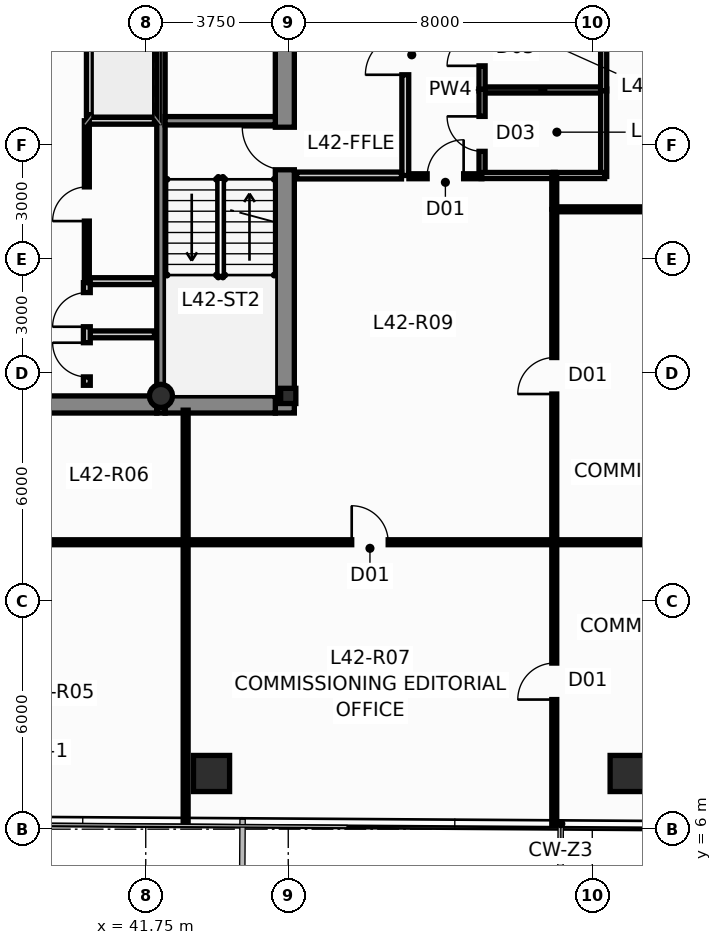
"""IFC4 building model, lengths in metres.
Left out: names, types, materials, properties, quantities, classifications, styles, units other than length and angle.
Written with IfcOpenShell. Run it as: python <this file> out.ifc"""

import sys

from ifc_helpers import new_model, si_unit, direction, frame, frame_2d, origin, origin_2d, place, context, subcontext, project, spatial, rectangle, hollow_rectangle, hollow_circle, i_section, extrude, source, transform, mapped, element, fill, save


model = new_model("IFC4")
c1 = context("Model", 3, precision=1e-05, world=origin(), true_north=direction((0.0, 1.0)))
c2 = subcontext(c1, "Body", "Model", "MODEL_VIEW")
j1 = project(units=[si_unit("LENGTHUNIT", "METRE"), si_unit("PLANEANGLEUNIT", "RADIAN")], contexts=[c1])
p1 = place(None, origin())
s1 = spatial("IfcSite", under=j1, at=p1, CompositionType="ELEMENT")
p2 = place(p1, origin())
s2 = spatial("IfcBuilding", under=s1, at=p2, CompositionType="ELEMENT")
p3 = place(p2, frame((0.0, 0.0, 162.15)))
s3 = spatial("IfcBuildingStorey", under=s2, at=p3, CompositionType="ELEMENT", Elevation=162.15)
m1 = source(origin(), c2, "Body", "SweptSolid", [
    extrude(i_section(OverallWidth=0.4, OverallDepth=0.4, WebThickness=0.02, FlangeThickness=0.032, at=origin_2d()), origin(), (0.0, 0.0, 1.0), 3.65),
])
p4 = place(p3, frame((45.5, 17.4, 0.0), z_axis=(0.0, 0.0, 1.0), x_axis=(1.0, 0.0, 0.0)))
e1 = element("IfcColumn", 1, at=p4, inside=s3, PredefinedType="COLUMN", context=c2, shape_type="MappedRepresentation", body=[
    mapped(m1, transform((0.0, 0.0, 0.0), scale=1.0)),
])
m2 = source(origin(), c2, "Body", "SweptSolid", [
    extrude(hollow_circle(Radius=0.305, WallThickness=0.025, at=origin_2d()), origin(), (0.0, 0.0, 1.0), 3.65),
])
p5 = place(p3, frame((42.15, 17.4, 0.0), z_axis=(0.0, 0.0, 1.0), x_axis=(1.0, 0.0, 0.0)))
e2 = element("IfcColumn", 2, at=p5, inside=s3, PredefinedType="COLUMN", context=c2, shape_type="MappedRepresentation", body=[
    mapped(m2, transform((0.0, 0.0, 0.0), scale=1.0)),
])
p6 = place(p3, frame((45.41, 16.95, 0.0), z_axis=(0.0, 0.0, 1.0), x_axis=(0.0, 1.0, 0.0)))
e3 = element("IfcWall", 3, at=p6, inside=s3, PredefinedType="SHEAR", context=c2, shape_type="SweptSolid", body=[
    extrude(rectangle(XDim=13.275, YDim=0.5, at=frame_2d((6.638, 0.0))), origin(), (0.0, 0.0, 1.0), 3.65),
])
p7 = place(p6, frame((6.4, 0.0, 0.0)))
e4 = element("IfcOpeningElement", 4, at=p7, cuts=e3, PredefinedType="OPENING", context=c2, shape_type="SweptSolid", body=[
    extrude(rectangle(XDim=1.12, YDim=2.15, at=frame_2d((0.56, 1.075))), frame((0.0, 0.262, 0.0), z_axis=(0.0, -1.0, 0.0), x_axis=(1.0, 0.0, 0.0)), (0.0, 0.0, 1.0), 0.524),
])
p8 = place(p6, frame((10.85, 0.0, 0.0)))
e5 = element("IfcOpeningElement", 5, at=p8, cuts=e3, PredefinedType="OPENING", context=c2, shape_type="SweptSolid", body=[
    extrude(rectangle(XDim=1.2, YDim=2.2, at=frame_2d((0.6, 1.1))), frame((0.0, 0.262, 0.0), z_axis=(0.0, -1.0, 0.0), x_axis=(1.0, 0.0, 0.0)), (0.0, 0.0, 1.0), 0.524),
])
p9 = place(p3, frame((33.96, 17.175, 0.0), z_axis=(0.0, 0.0, 1.0), x_axis=(1.0, 0.0, 0.0)))
e6 = element("IfcWall", 6, at=p9, inside=s3, PredefinedType="SHEAR", context=c2, shape_type="SweptSolid", body=[
    extrude(rectangle(XDim=8.08, YDim=0.45, at=frame_2d((4.04, 0.0))), origin(), (0.0, 0.0, 1.0), 3.65),
])
p10 = place(p3, frame((42.26, 17.175, 0.0), z_axis=(0.0, 0.0, 1.0), x_axis=(1.0, 0.0, 0.0)))
e7 = element("IfcWall", 7, at=p10, inside=s3, PredefinedType="SHEAR", context=c2, shape_type="SweptSolid", body=[
    extrude(rectangle(XDim=2.9, YDim=0.45, at=frame_2d((1.45, 0.0))), origin(), (0.0, 0.0, 1.0), 3.65),
])
p11 = place(p3, frame((42.15, 16.95, 0.0), z_axis=(0.0, 0.0, 1.0), x_axis=(0.0, 1.0, 0.0)))
e8 = element("IfcWall", 8, at=p11, inside=s3, PredefinedType="SHEAR", context=c2, shape_type="SweptSolid", body=[
    extrude(rectangle(XDim=13.275, YDim=0.22, at=frame_2d((6.638, 0.0))), origin(), (0.0, 0.0, 1.0), 3.65),
])
p12 = place(p3, frame((42.26, 24.64, 0.0), z_axis=(0.0, 0.0, 1.0), x_axis=(1.0, 0.0, 0.0)))
e9 = element("IfcWall", 9, at=p12, inside=s3, PredefinedType="SHEAR", context=c2, shape_type="SweptSolid", body=[
    extrude(rectangle(XDim=2.9, YDim=0.22, at=frame_2d((1.45, 0.0))), origin(), (0.0, 0.0, 1.0), 3.65),
])
m3 = source(origin(), c2, "Body", "SweptSolid", [
    extrude(hollow_rectangle(XDim=0.95, YDim=0.95, WallThickness=0.05, at=origin_2d()), origin(), (0.0, 0.0, 1.0), 3.651),
])
p13 = place(p3, frame((43.481, 7.465, 0.0), z_axis=(0.004480382638, 0.019793929266, 0.999794042058), x_axis=(-0.975326687046, 0.220766513622, 0.0)))
e10 = element("IfcColumn", 10, at=p13, inside=s3, PredefinedType="COLUMN", context=c2, shape_type="MappedRepresentation", body=[
    mapped(m3, transform((0.0, 0.0, 0.0), scale=1.0)),
])
m4 = source(origin(), c2, "Body", "SweptSolid", [
    extrude(hollow_rectangle(XDim=0.95, YDim=0.95, WallThickness=0.05, at=origin_2d()), origin(), (0.0, 0.0, 1.0), 3.651),
])
p14 = place(p3, frame((54.445, 7.465, 0.0), z_axis=(0.013440068782, 0.019792340097, 0.999713772949), x_axis=(-0.827290216258, 0.561774775229, 0.0)))
e11 = element("IfcColumn", 11, at=p14, inside=s3, PredefinedType="COLUMN", context=c2, shape_type="MappedRepresentation", body=[
    mapped(m4, transform((0.0, 0.0, 0.0), scale=1.0)),
])
p15 = place(p3, frame((40.28, 24.8, 0.0), z_axis=(0.0, 0.0, 1.0), x_axis=(0.0, 1.0, 0.0)))
e12 = element("IfcWall", 12, at=p15, inside=s3, PredefinedType="PARTITIONING", context=c2, shape_type="SweptSolid", body=[
    extrude(rectangle(XDim=2.0, YDim=0.18, at=frame_2d((1.0, 0.0))), origin(), (0.0, 0.0, 1.0), 3.4),
])
p16 = place(p3, frame((40.2, 24.64, 0.0), z_axis=(0.0, 0.0, 1.0), x_axis=(1.0, 0.0, 0.0)))
e13 = element("IfcWall", 13, at=p16, inside=s3, PredefinedType="PARTITIONING", context=c2, shape_type="SweptSolid", body=[
    extrude(rectangle(XDim=1.78, YDim=0.18, at=frame_2d((0.89, 0.0))), origin(), (0.0, 0.0, 1.0), 3.4),
])
p17 = place(p3, frame((48.58, 23.2, 0.0), z_axis=(0.0, 0.0, 1.0), x_axis=(0.0, 1.0, 0.0)))
e14 = element("IfcWall", 14, at=p17, inside=s3, PredefinedType="PARTITIONING", context=c2, shape_type="SweptSolid", body=[
    extrude(rectangle(XDim=6.4, YDim=0.18, at=frame_2d((3.2, 0.0))), origin(), (0.0, 0.0, 1.0), 3.078),
])
p18 = place(p17, frame((2.65, 0.0, 0.0)))
e15 = element("IfcOpeningElement", 15, at=p18, cuts=e14, PredefinedType="OPENING", context=c2, shape_type="SweptSolid", body=[
    extrude(rectangle(XDim=1.05, YDim=2.15, at=frame_2d((0.525, 1.075))), frame((0.0, 0.102, 0.0), z_axis=(0.0, -1.0, 0.0), x_axis=(1.0, 0.0, 0.0)), (0.0, 0.0, 1.0), 0.204),
])
p19 = place(p3, frame((45.72, 23.2, 0.0), z_axis=(0.0, 0.0, 1.0), x_axis=(1.0, 0.0, 0.0)))
e16 = element("IfcWall", 16, at=p19, inside=s3, PredefinedType="PARTITIONING", context=c2, shape_type="SweptSolid", body=[
    extrude(rectangle(XDim=2.76, YDim=0.18, at=frame_2d((1.38, 0.0))), origin(), (0.0, 0.0, 1.0), 3.4),
])
p20 = place(p3, frame((40.22, 20.42, 0.0), z_axis=(0.0, 0.0, 1.0), x_axis=(1.0, 0.0, 0.0)))
e17 = element("IfcWall", 17, at=p20, inside=s3, PredefinedType="PARTITIONING", context=c2, shape_type="SweptSolid", body=[
    extrude(rectangle(XDim=1.76, YDim=0.18, at=frame_2d((0.88, 0.0))), origin(), (0.0, 0.0, 1.0), 3.4),
])
p21 = place(p3, frame((40.2, 20.5, 0.0), z_axis=(0.0, 0.0, 1.0), x_axis=(0.0, 1.0, 0.0)))
e18 = element("IfcWall", 18, at=p21, inside=s3, PredefinedType="PARTITIONING", context=c2, shape_type="SweptSolid", body=[
    extrude(rectangle(XDim=4.14, YDim=0.13, at=frame_2d((2.07, 0.0))), origin(), (0.0, 0.0, 1.0), 3.4),
])
p22 = place(p21, frame((1.5, 0.0, 0.0)))
e19 = element("IfcOpeningElement", 19, at=p22, cuts=e18, PredefinedType="OPENING", context=c2, shape_type="SweptSolid", body=[
    extrude(rectangle(XDim=0.9, YDim=2.1, at=frame_2d((0.45, 1.05))), frame((0.0, 0.077, 0.0), z_axis=(0.0, -1.0, 0.0), x_axis=(1.0, 0.0, 0.0)), (0.0, 0.0, 1.0), 0.154),
])
p23 = place(p3, frame((40.28, 19.02, 0.0), z_axis=(0.0, 0.0, 1.0), x_axis=(1.0, 0.0, 0.0)))
e20 = element("IfcWall", 20, at=p23, inside=s3, PredefinedType="PARTITIONING", context=c2, shape_type="SweptSolid", body=[
    extrude(rectangle(XDim=1.7, YDim=0.18, at=frame_2d((0.85, 0.0))), origin(), (0.0, 0.0, 1.0), 3.4),
])
p24 = place(p3, frame((40.2, 17.68, 0.0), z_axis=(0.0, 0.0, 1.0), x_axis=(0.0, 1.0, 0.0)))
e21 = element("IfcWall", 21, at=p24, inside=s3, PredefinedType="PARTITIONING", context=c2, shape_type="SweptSolid", body=[
    extrude(rectangle(XDim=2.7, YDim=0.18, at=frame_2d((1.35, 0.0))), origin(), (0.0, 0.0, 1.0), 3.4),
])
p25 = place(p24, frame((0.22, 0.0, 0.0)))
e22 = element("IfcOpeningElement", 22, at=p25, cuts=e21, PredefinedType="OPENING", context=c2, shape_type="SweptSolid", body=[
    extrude(rectangle(XDim=0.9, YDim=2.1, at=frame_2d((0.45, 1.05))), frame((0.0, 0.102, 0.0), z_axis=(0.0, -1.0, 0.0), x_axis=(1.0, 0.0, 0.0)), (0.0, 0.0, 1.0), 0.204),
])
p26 = place(p24, frame((1.54, 0.0, 0.0)))
e23 = element("IfcOpeningElement", 23, at=p26, cuts=e21, PredefinedType="OPENING", context=c2, shape_type="SweptSolid", body=[
    extrude(rectangle(XDim=0.9, YDim=2.1, at=frame_2d((0.45, 1.05))), frame((0.0, 0.102, 0.0), z_axis=(0.0, -1.0, 0.0), x_axis=(1.0, 0.0, 0.0)), (0.0, 0.0, 1.0), 0.204),
])
p27 = place(p3, frame((50.575, 25.45, 0.0), z_axis=(0.0, 0.0, 1.0), x_axis=(1.0, 0.0, 0.0)))
e24 = element("IfcWall", 24, at=p27, inside=s3, PredefinedType="PLUMBINGWALL", context=c2, shape_type="SweptSolid", body=[
    extrude(rectangle(XDim=3.25, YDim=0.16, at=frame_2d((1.625, 0.0))), origin(), (0.0, 0.0, 1.0), 3.4),
])
p28 = place(p3, frame((50.6, 25.425, 0.0), z_axis=(0.0, 0.0, 1.0), x_axis=(0.0, 1.0, 0.0)))
e25 = element("IfcWall", 25, at=p28, inside=s3, PredefinedType="PLUMBINGWALL", context=c2, shape_type="SweptSolid", body=[
    extrude(rectangle(XDim=2.3, YDim=0.16, at=frame_2d((1.15, 0.0))), origin(), (0.0, 0.0, 1.0), 3.078),
])
p29 = place(p28, frame((0.66, 0.0, 0.0)))
e26 = element("IfcOpeningElement", 26, at=p29, cuts=e25, PredefinedType="OPENING", context=c2, shape_type="SweptSolid", body=[
    extrude(rectangle(XDim=0.92, YDim=2.1, at=frame_2d((0.46, 1.05))), frame((0.0, 0.092, 0.0), z_axis=(0.0, -1.0, 0.0), x_axis=(1.0, 0.0, 0.0)), (0.0, 0.0, 1.0), 0.184),
])
p30 = place(p3, frame((50.6, 23.175, 0.0), z_axis=(0.0, 0.0, 1.0), x_axis=(0.0, 1.0, 0.0)))
e27 = element("IfcWall", 27, at=p30, inside=s3, PredefinedType="PLUMBINGWALL", context=c2, shape_type="SweptSolid", body=[
    extrude(rectangle(XDim=2.3, YDim=0.16, at=frame_2d((1.15, 0.0))), origin(), (0.0, 0.0, 1.0), 3.078),
])
p31 = place(p30, frame((0.66, 0.0, 0.0)))
e28 = element("IfcOpeningElement", 28, at=p31, cuts=e27, PredefinedType="OPENING", context=c2, shape_type="SweptSolid", body=[
    extrude(rectangle(XDim=0.92, YDim=2.1, at=frame_2d((0.46, 1.05))), frame((0.0, 0.092, 0.0), z_axis=(0.0, -1.0, 0.0), x_axis=(1.0, 0.0, 0.0)), (0.0, 0.0, 1.0), 0.184),
])
p32 = place(p3, frame((53.8, 23.175, 0.0), z_axis=(0.0, 0.0, 1.0), x_axis=(0.0, 1.0, 0.0)))
e29 = element("IfcWall", 29, at=p32, inside=s3, PredefinedType="PLUMBINGWALL", context=c2, shape_type="SweptSolid", body=[
    extrude(rectangle(XDim=2.3, YDim=0.16, at=frame_2d((1.15, 0.0))), origin(), (0.0, 0.0, 1.0), 3.078),
])
p33 = place(p3, frame((53.8, 25.425, 0.0), z_axis=(0.0, 0.0, 1.0), x_axis=(0.0, 1.0, 0.0)))
e30 = element("IfcWall", 30, at=p33, inside=s3, PredefinedType="PLUMBINGWALL", context=c2, shape_type="SweptSolid", body=[
    extrude(rectangle(XDim=2.3, YDim=0.16, at=frame_2d((1.15, 0.0))), origin(), (0.0, 0.0, 1.0), 3.4),
])
p34 = place(p3, frame((50.575, 23.2, 0.0), z_axis=(0.0, 0.0, 1.0), x_axis=(1.0, 0.0, 0.0)))
e31 = element("IfcWall", 31, at=p34, inside=s3, PredefinedType="PLUMBINGWALL", context=c2, shape_type="SweptSolid", body=[
    extrude(rectangle(XDim=1.95, YDim=0.16, at=frame_2d((0.975, 0.0))), origin(), (0.0, 0.0, 1.0), 3.4),
])
p35 = place(p3, frame((52.475, 23.2, 0.0), z_axis=(0.0, 0.0, 1.0), x_axis=(1.0, 0.0, 0.0)))
e32 = element("IfcWall", 32, at=p35, inside=s3, PredefinedType="PLUMBINGWALL", context=c2, shape_type="SweptSolid", body=[
    extrude(rectangle(XDim=1.35, YDim=0.16, at=frame_2d((0.675, 0.0))), origin(), (0.0, 0.0, 1.0), 3.4),
])
p36 = place(p3, frame((52.505, 13.55, 0.0), z_axis=(0.0, 0.0, 1.0), x_axis=(1.0, 0.0, 0.0)))
e33 = element("IfcWall", 33, at=p36, inside=s3, PredefinedType="PARTITIONING", context=c2, shape_type="SweptSolid", body=[
    extrude(rectangle(XDim=12.118, YDim=0.13, at=frame_2d((6.059, 0.0))), origin(), (0.0, 0.0, 1.0), 3.4),
])
p37 = place(p3, frame((42.805, 13.55, 0.0), z_axis=(0.0, 0.0, 1.0), x_axis=(1.0, 0.0, 0.0)))
e34 = element("IfcWall", 34, at=p37, inside=s3, PredefinedType="PARTITIONING", context=c2, shape_type="SweptSolid", body=[
    extrude(rectangle(XDim=9.69, YDim=0.13, at=frame_2d((4.845, 0.0))), origin(), (0.0, 0.0, 1.0), 3.4),
])
p38 = place(p37, frame((4.365, 0.0, 0.0)))
e35 = element("IfcOpeningElement", 35, at=p38, cuts=e34, PredefinedType="OPENING", context=c2, shape_type="SweptSolid", body=[
    extrude(rectangle(XDim=0.96, YDim=2.15, at=frame_2d((0.48, 1.075))), frame((0.0, 0.077, 0.0), z_axis=(0.0, -1.0, 0.0), x_axis=(1.0, 0.0, 0.0)), (0.0, 0.0, 1.0), 0.154),
])
p39 = place(p3, frame((33.205, 13.55, 0.0), z_axis=(0.0, 0.0, 1.0), x_axis=(1.0, 0.0, 0.0)))
e36 = element("IfcWall", 36, at=p39, inside=s3, PredefinedType="PARTITIONING", context=c2, shape_type="SweptSolid", body=[
    extrude(rectangle(XDim=9.59, YDim=0.13, at=frame_2d((4.795, 0.0))), origin(), (0.0, 0.0, 1.0), 3.4),
])
p40 = place(p39, frame((4.315, 0.0, 0.0)))
e37 = element("IfcOpeningElement", 37, at=p40, cuts=e36, PredefinedType="OPENING", context=c2, shape_type="SweptSolid", body=[
    extrude(rectangle(XDim=0.96, YDim=2.15, at=frame_2d((0.48, 1.075))), frame((0.0, 0.077, 0.0), z_axis=(0.0, -1.0, 0.0), x_axis=(1.0, 0.0, 0.0)), (0.0, 0.0, 1.0), 0.154),
])
p41 = place(p3, frame((52.5, 13.555, 0.0), z_axis=(0.0, 0.0, 1.0), x_axis=(0.0, 1.0, 0.0)))
e38 = element("IfcWall", 38, at=p41, inside=s3, PredefinedType="PARTITIONING", context=c2, shape_type="SweptSolid", body=[
    extrude(rectangle(XDim=8.75, YDim=0.13, at=frame_2d((4.375, 0.0))), origin(), (0.0, 0.0, 1.0), 3.078),
])
p42 = place(p41, frame((3.895, 0.0, 0.0)))
e39 = element("IfcOpeningElement", 39, at=p42, cuts=e38, PredefinedType="OPENING", context=c2, shape_type="SweptSolid", body=[
    extrude(rectangle(XDim=0.96, YDim=2.15, at=frame_2d((0.48, 1.075))), frame((0.0, 0.077, 0.0), z_axis=(0.0, -1.0, 0.0), x_axis=(1.0, 0.0, 0.0)), (0.0, 0.0, 1.0), 0.154),
])
p43 = place(p3, frame((52.5, 6.138, 0.0), z_axis=(0.0, 0.0, 1.0), x_axis=(0.0, 1.0, 0.0)))
e40 = element("IfcWall", 40, at=p43, inside=s3, PredefinedType="PARTITIONING", context=c2, shape_type="SweptSolid", body=[
    extrude(rectangle(XDim=7.406, YDim=0.13, at=frame_2d((3.703, 0.0))), origin(), (0.0, 0.0, 1.0), 3.4),
])
p44 = place(p43, frame((3.272, 0.0, 0.0)))
e41 = element("IfcOpeningElement", 41, at=p44, cuts=e40, PredefinedType="OPENING", context=c2, shape_type="SweptSolid", body=[
    extrude(rectangle(XDim=0.96, YDim=2.15, at=frame_2d((0.48, 1.075))), frame((0.0, 0.077, 0.0), z_axis=(0.0, -1.0, 0.0), x_axis=(1.0, 0.0, 0.0)), (0.0, 0.0, 1.0), 0.154),
])
p45 = place(p3, frame((42.8, 6.202, 0.0), z_axis=(0.0, 0.0, 1.0), x_axis=(0.0, 1.0, 0.0)))
e42 = element("IfcWall", 42, at=p45, inside=s3, PredefinedType="PARTITIONING", context=c2, shape_type="SweptSolid", body=[
    extrude(rectangle(XDim=7.343, YDim=0.13, at=frame_2d((3.671, 0.0))), origin(), (0.0, 0.0, 1.0), 3.4),
])
p46 = place(p3, frame((52.505, 22.31, 0.0), z_axis=(0.0, 0.0, 1.0), x_axis=(1.0, 0.0, 0.0)))
e43 = element("IfcWall", 43, at=p46, inside=s3, PredefinedType="PARTITIONING", context=c2, shape_type="SweptSolid", body=[
    extrude(rectangle(XDim=6.875, YDim=0.13, at=frame_2d((3.437, 0.0))), origin(), (0.0, 0.0, 1.0), 3.4),
])
p47 = place(p46, frame((3.012, 0.0, 0.0)))
e44 = element("IfcOpeningElement", 44, at=p47, cuts=e43, PredefinedType="OPENING", context=c2, shape_type="SweptSolid", body=[
    extrude(rectangle(XDim=0.96, YDim=2.15, at=frame_2d((0.48, 1.075))), frame((0.0, 0.077, 0.0), z_axis=(0.0, -1.0, 0.0), x_axis=(1.0, 0.0, 0.0)), (0.0, 0.0, 1.0), 0.154),
])
p48 = place(p3, frame((42.8, 13.555, 0.0), z_axis=(0.0, 0.0, 1.0), x_axis=(0.0, 1.0, 0.0)))
e45 = element("IfcWall", 45, at=p48, inside=s3, PredefinedType="PARTITIONING", context=c2, shape_type="SweptSolid", body=[
    extrude(rectangle(XDim=3.47, YDim=0.13, at=frame_2d((1.735, 0.0))), origin(), (0.0, 0.0, 1.0), 3.4),
])
p49 = place(p3, frame((48.675, 23.18, 0.0), z_axis=(0.0, 0.0, 1.0), x_axis=(1.0, 0.0, 0.0)))
e46 = element("IfcWall", 46, at=p49, inside=s3, PredefinedType="PARTITIONING", context=c2, shape_type="SweptSolid", body=[
    extrude(rectangle(XDim=1.92, YDim=0.13, at=frame_2d((0.96, 0.0))), origin(), (0.0, 0.0, 1.0), 3.4),
])
p50 = place(p49, frame((0.48, 0.0, 0.0)))
e47 = element("IfcOpeningElement", 47, at=p50, cuts=e46, PredefinedType="OPENING", context=c2, shape_type="SweptSolid", body=[
    extrude(rectangle(XDim=0.96, YDim=2.15, at=frame_2d((0.48, 1.075))), frame((0.0, 0.077, 0.0), z_axis=(0.0, -1.0, 0.0), x_axis=(1.0, 0.0, 0.0)), (0.0, 0.0, 1.0), 0.154),
])
p51 = place(p3, frame((52.5, 22.315, 0.0), z_axis=(0.0, 0.0, 1.0), x_axis=(0.0, 1.0, 0.0)))
e48 = element("IfcWall", 48, at=p51, inside=s3, PredefinedType="PARTITIONING", context=c2, shape_type="SweptSolid", body=[
    extrude(rectangle(XDim=0.88, YDim=0.13, at=frame_2d((0.44, 0.0))), origin(), (0.0, 0.0, 1.0), 3.4),
])
p52 = place(p7, origin())
e49 = element("IfcDoor", 49, at=p52, inside=s3, OperationType="SINGLE_SWING_RIGHT", PredefinedType="DOOR", context=c2, shape_type="SweptSolid", body=[
    extrude(rectangle(XDim=1.12, YDim=2.15, at=frame_2d((0.56, 1.075))), frame((0.0, 0.025, 0.0), z_axis=(0.0, -1.0, 0.0), x_axis=(1.0, 0.0, 0.0)), (0.0, 0.0, 1.0), 0.05),
])
fill(e4, e49)
p53 = place(p18, origin())
e50 = element("IfcDoor", 50, at=p53, inside=s3, OperationType="SINGLE_SWING_LEFT", PredefinedType="DOOR", context=c2, shape_type="SweptSolid", body=[
    extrude(rectangle(XDim=1.05, YDim=2.15, at=frame_2d((0.525, 1.075))), frame((0.0, 0.025, 0.0), z_axis=(0.0, -1.0, 0.0), x_axis=(1.0, 0.0, 0.0)), (0.0, 0.0, 1.0), 0.05),
])
fill(e15, e50)
p54 = place(p22, origin())
e51 = element("IfcDoor", 51, at=p54, inside=s3, OperationType="SINGLE_SWING_LEFT", PredefinedType="DOOR", context=c2, shape_type="SweptSolid", body=[
    extrude(rectangle(XDim=0.9, YDim=2.1, at=frame_2d((0.45, 1.05))), frame((0.0, 0.025, 0.0), z_axis=(0.0, -1.0, 0.0), x_axis=(1.0, 0.0, 0.0)), (0.0, 0.0, 1.0), 0.05),
])
fill(e19, e51)
p55 = place(p25, origin())
e52 = element("IfcDoor", 52, at=p55, inside=s3, OperationType="SINGLE_SWING_RIGHT", PredefinedType="DOOR", context=c2, shape_type="SweptSolid", body=[
    extrude(rectangle(XDim=0.9, YDim=2.1, at=frame_2d((0.45, 1.05))), frame((0.0, 0.025, 0.0), z_axis=(0.0, -1.0, 0.0), x_axis=(1.0, 0.0, 0.0)), (0.0, 0.0, 1.0), 0.05),
])
fill(e22, e52)
p56 = place(p26, origin())
e53 = element("IfcDoor", 53, at=p56, inside=s3, OperationType="SINGLE_SWING_LEFT", PredefinedType="DOOR", context=c2, shape_type="SweptSolid", body=[
    extrude(rectangle(XDim=0.9, YDim=2.1, at=frame_2d((0.45, 1.05))), frame((0.0, 0.025, 0.0), z_axis=(0.0, -1.0, 0.0), x_axis=(1.0, 0.0, 0.0)), (0.0, 0.0, 1.0), 0.05),
])
fill(e23, e53)
p57 = place(p29, origin())
e54 = element("IfcDoor", 54, at=p57, inside=s3, OperationType="SINGLE_SWING_LEFT", PredefinedType="DOOR", context=c2, shape_type="SweptSolid", body=[
    extrude(rectangle(XDim=0.92, YDim=2.1, at=frame_2d((0.46, 1.05))), frame((0.0, 0.025, 0.0), z_axis=(0.0, -1.0, 0.0), x_axis=(1.0, 0.0, 0.0)), (0.0, 0.0, 1.0), 0.05),
])
fill(e26, e54)
p58 = place(p31, origin())
e55 = element("IfcDoor", 55, at=p58, inside=s3, OperationType="SINGLE_SWING_RIGHT", PredefinedType="DOOR", context=c2, shape_type="SweptSolid", body=[
    extrude(rectangle(XDim=0.92, YDim=2.1, at=frame_2d((0.46, 1.05))), frame((0.0, 0.025, 0.0), z_axis=(0.0, -1.0, 0.0), x_axis=(1.0, 0.0, 0.0)), (0.0, 0.0, 1.0), 0.05),
])
fill(e28, e55)
p59 = place(p38, origin())
e56 = element("IfcDoor", 56, at=p59, inside=s3, OperationType="SINGLE_SWING_LEFT", PredefinedType="DOOR", context=c2, shape_type="SweptSolid", body=[
    extrude(rectangle(XDim=0.96, YDim=2.15, at=frame_2d((0.48, 1.075))), frame((0.0, 0.025, 0.0), z_axis=(0.0, -1.0, 0.0), x_axis=(1.0, 0.0, 0.0)), (0.0, 0.0, 1.0), 0.05),
])
fill(e35, e56)
p60 = place(p42, origin())
e57 = element("IfcDoor", 57, at=p60, inside=s3, OperationType="SINGLE_SWING_LEFT", PredefinedType="DOOR", context=c2, shape_type="SweptSolid", body=[
    extrude(rectangle(XDim=0.96, YDim=2.15, at=frame_2d((0.48, 1.075))), frame((0.0, 0.025, 0.0), z_axis=(0.0, -1.0, 0.0), x_axis=(1.0, 0.0, 0.0)), (0.0, 0.0, 1.0), 0.05),
])
fill(e39, e57)
p61 = place(p44, origin())
e58 = element("IfcDoor", 58, at=p61, inside=s3, OperationType="SINGLE_SWING_LEFT", PredefinedType="DOOR", context=c2, shape_type="SweptSolid", body=[
    extrude(rectangle(XDim=0.96, YDim=2.15, at=frame_2d((0.48, 1.075))), frame((0.0, 0.025, 0.0), z_axis=(0.0, -1.0, 0.0), x_axis=(1.0, 0.0, 0.0)), (0.0, 0.0, 1.0), 0.05),
])
fill(e41, e58)
p62 = place(p50, origin())
e59 = element("IfcDoor", 59, at=p62, inside=s3, OperationType="SINGLE_SWING_RIGHT", PredefinedType="DOOR", context=c2, shape_type="SweptSolid", body=[
    extrude(rectangle(XDim=0.96, YDim=2.15, at=frame_2d((0.48, 1.075))), frame((0.0, 0.025, 0.0), z_axis=(0.0, -1.0, 0.0), x_axis=(1.0, 0.0, 0.0)), (0.0, 0.0, 1.0), 0.05),
])
fill(e47, e59)
save(model, sys.argv[1])
